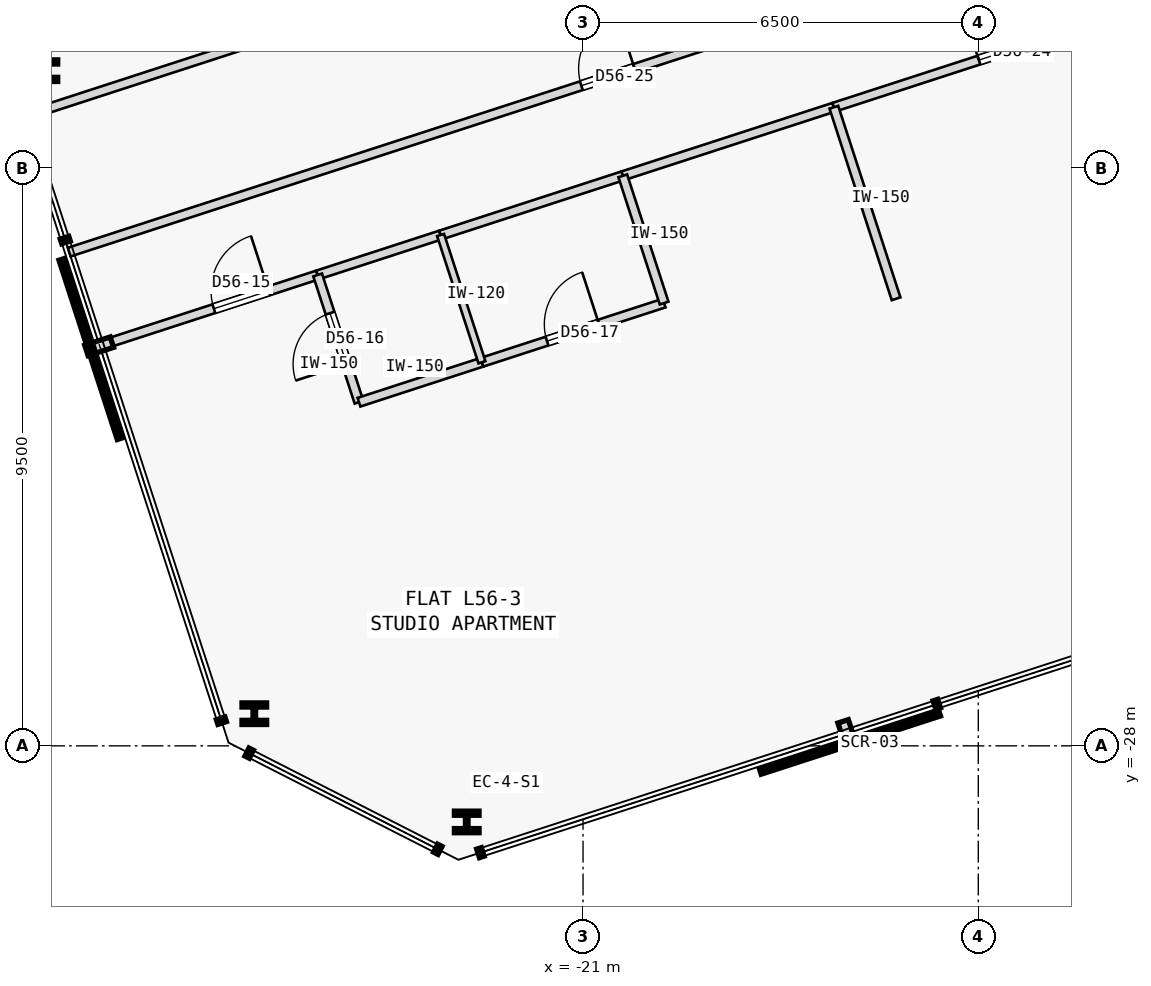
"""IFC4 building model, lengths in metres.
Left out: names, types, materials, properties, quantities, classifications, styles, units other than length and angle.
Written with IfcOpenShell. Run it as: python <this file> out.ifc"""

import sys

from ifc_helpers import new_model, si_unit, direction, frame, frame_2d, origin, origin_2d, place, context, subcontext, project, spatial, rectangle, i_section, extrude, element, fill, save


model = new_model("IFC4")
c1 = context("Model", 3, precision=1e-05, world=origin(), true_north=direction((0.0, 1.0)))
c2 = subcontext(c1, "Body", "Model", "MODEL_VIEW")
j1 = project(units=[si_unit("LENGTHUNIT", "METRE"), si_unit("PLANEANGLEUNIT", "RADIAN")], contexts=[c1])
p1 = place(None, origin())
s1 = spatial("IfcSite", under=j1, at=p1, CompositionType="ELEMENT")
p2 = place(p1, origin())
s2 = spatial("IfcBuilding", under=s1, at=p2, CompositionType="ELEMENT")
p3 = place(p2, frame((0.0, 0.0, 214.25)))
s3 = spatial("IfcBuildingStorey", under=s2, at=p3, CompositionType="ELEMENT", Elevation=214.25)
for number, where, z_axis, x_axis in (
    (1, (-22.913, -29.251, 0.0), (0.0, 0.0, 1.0), (1.0, 0.0, 0.0)),
    (2, (-29.842, -16.897, 0.0), (0.0, 0.0, 1.0), (1.0, 0.0, 0.0)),
    (3, (-26.406, -27.471, 0.0), (0.0, 0.0, 1.0), (1.0, 0.0, 0.0)),
):
    element("IfcColumn", number, at=place(p3, frame(where, z_axis=z_axis, x_axis=x_axis)), inside=s3, PredefinedType="COLUMN", context=c2, shape_type="SweptSolid", body=[
        extrude(i_section(OverallWidth=0.405, OverallDepth=0.355, WebThickness=0.042, FlangeThickness=0.068, FilletRadius=0.015, at=origin_2d()), origin(), (0.0, 0.0, 1.0), 3.35),
    ])
p4 = place(p3, frame((-28.95, -21.421, 0.0), z_axis=(0.0, 0.0, 1.0), x_axis=(0.951052151329, 0.309030428036, 0.0)))
e4 = element("IfcWall", 4, at=p4, inside=s3, PredefinedType="PARTITIONING", context=c2, shape_type="SweptSolid", body=[
    extrude(rectangle(XDim=3.77, YDim=0.15, at=frame_2d((1.885, 0.0))), origin(), (0.0, 0.0, 1.0), 3.125),
])
p5 = place(p4, frame((1.975, 0.0, 0.0)))
e5 = element("IfcOpeningElement", 5, at=p5, cuts=e4, PredefinedType="OPENING", context=c2, shape_type="SweptSolid", body=[
    extrude(rectangle(XDim=0.95, YDim=2.15, at=frame_2d((0.475, 1.075))), frame((0.0, 0.085, 0.0), z_axis=(0.0, -1.0, 0.0), x_axis=(1.0, 0.0, 0.0)), (0.0, 0.0, 1.0), 0.17),
])
p6 = place(p3, frame((-20.347, -18.626, 0.0), z_axis=(0.0, 0.0, 1.0), x_axis=(0.951057168147, 0.309014988174, 0.0)))
e6 = element("IfcWall", 6, at=p6, inside=s3, PredefinedType="PARTITIONING", context=c2, shape_type="SweptSolid", body=[
    extrude(rectangle(XDim=3.65, YDim=0.15, at=frame_2d((1.825, 0.0))), origin(), (0.0, 0.0, 1.0), 3.125),
])
p7 = place(p3, frame((-25.365, -20.256, 0.0), z_axis=(0.0, 0.0, 1.0), x_axis=(0.951056007502, 0.309018560274, 0.0)))
e7 = element("IfcWall", 7, at=p7, inside=s3, PredefinedType="PARTITIONING", context=c2, shape_type="SweptSolid", body=[
    extrude(rectangle(XDim=2.126, YDim=0.15, at=frame_2d((1.063, 0.0))), origin(), (0.0, 0.0, 1.0), 3.125),
])
p8 = place(p3, frame((-23.343, -19.599, 0.0), z_axis=(0.0, 0.0, 1.0), x_axis=(0.951058557014, 0.309010713619, 0.0)))
e8 = element("IfcWall", 8, at=p8, inside=s3, PredefinedType="PARTITIONING", context=c2, shape_type="SweptSolid", body=[
    extrude(rectangle(XDim=3.15, YDim=0.15, at=frame_2d((1.575, 0.0))), origin(), (0.0, 0.0, 1.0), 3.125),
])
p9 = place(p3, frame((-16.875, -17.498, 0.0), z_axis=(0.0, 0.0, 1.0), x_axis=(0.951057944303, 0.309012599384, 0.0)))
e9 = element("IfcWall", 9, at=p9, inside=s3, PredefinedType="PARTITIONING", context=c2, shape_type="SweptSolid", body=[
    extrude(rectangle(XDim=5.936, YDim=0.15, at=frame_2d((2.968, 0.0))), origin(), (0.0, 0.0, 1.0), 3.125),
])
p10 = place(p9, frame((2.508, 0.0, 0.0)))
e10 = element("IfcOpeningElement", 10, at=p10, cuts=e9, PredefinedType="OPENING", context=c2, shape_type="SweptSolid", body=[
    extrude(rectangle(XDim=0.92, YDim=2.15, at=frame_2d((0.46, 1.075))), frame((0.0, 0.085, 0.0), z_axis=(0.0, -1.0, 0.0), x_axis=(1.0, 0.0, 0.0)), (0.0, 0.0, 1.0), 0.17),
])
p11 = place(p3, frame((-29.45, -19.881, 0.0), z_axis=(0.0, 0.0, 1.0), x_axis=(0.95105650271, 0.309017036186, 0.0)))
e11 = element("IfcWall", 11, at=p11, inside=s3, PredefinedType="PARTITIONING", context=c2, shape_type="SweptSolid", body=[
    extrude(rectangle(XDim=18.632, YDim=0.15, at=frame_2d((9.316, 0.0))), origin(), (0.0, 0.0, 1.0), 3.125),
])
p12 = place(p11, frame((8.856, 0.0, 0.0)))
e12 = element("IfcOpeningElement", 12, at=p12, cuts=e11, PredefinedType="OPENING", context=c2, shape_type="SweptSolid", body=[
    extrude(rectangle(XDim=0.92, YDim=2.15, at=frame_2d((0.46, 1.075))), frame((0.0, 0.085, 0.0), z_axis=(0.0, -1.0, 0.0), x_axis=(1.0, 0.0, 0.0)), (0.0, 0.0, 1.0), 0.17),
])
p13 = place(p3, frame((-24.685, -22.349, 0.0), z_axis=(0.0, 0.0, 1.0), x_axis=(-0.309060979314, 0.951042223598, 0.0)))
e13 = element("IfcWall", 13, at=p13, inside=s3, PredefinedType="PARTITIONING", context=c2, shape_type="SweptSolid", body=[
    extrude(rectangle(XDim=2.2, YDim=0.15, at=frame_2d((1.1, 0.0))), origin(), (0.0, 0.0, 1.0), 3.125),
])
p14 = place(p13, frame((0.66, 0.0, 0.0)))
e14 = element("IfcOpeningElement", 14, at=p14, cuts=e13, PredefinedType="OPENING", context=c2, shape_type="SweptSolid", body=[
    extrude(rectangle(XDim=0.88, YDim=2.15, at=frame_2d((0.44, 1.075))), frame((0.0, 0.085, 0.0), z_axis=(0.0, -1.0, 0.0), x_axis=(1.0, 0.0, 0.0)), (0.0, 0.0, 1.0), 0.17),
])
p15 = place(p3, frame((-24.685, -22.349, 0.0), z_axis=(0.0, 0.0, 1.0), x_axis=(0.951056007502, 0.309018560274, 0.0)))
e15 = element("IfcWall", 15, at=p15, inside=s3, PredefinedType="PARTITIONING", context=c2, shape_type="SweptSolid", body=[
    extrude(rectangle(XDim=2.126, YDim=0.15, at=frame_2d((1.063, 0.0))), origin(), (0.0, 0.0, 1.0), 3.125),
])
p16 = place(p3, frame((-22.663, -21.692, 0.0), z_axis=(0.0, 0.0, 1.0), x_axis=(0.951058557014, 0.309010713619, 0.0)))
e16 = element("IfcWall", 16, at=p16, inside=s3, PredefinedType="PARTITIONING", context=c2, shape_type="SweptSolid", body=[
    extrude(rectangle(XDim=3.15, YDim=0.15, at=frame_2d((1.575, 0.0))), origin(), (0.0, 0.0, 1.0), 3.125),
])
p17 = place(p16, frame((1.125, 0.0, 0.0)))
e17 = element("IfcOpeningElement", 17, at=p17, cuts=e16, PredefinedType="OPENING", context=c2, shape_type="SweptSolid", body=[
    extrude(rectangle(XDim=0.9, YDim=2.15, at=frame_2d((0.45, 1.075))), frame((0.0, 0.085, 0.0), z_axis=(0.0, -1.0, 0.0), x_axis=(1.0, 0.0, 0.0)), (0.0, 0.0, 1.0), 0.17),
])
p18 = place(p3, frame((-19.667, -20.718, 0.0), z_axis=(0.0, 0.0, 1.0), x_axis=(-0.309060979314, 0.951042223598, 0.0)))
e18 = element("IfcWall", 18, at=p18, inside=s3, PredefinedType="PARTITIONING", context=c2, shape_type="SweptSolid", body=[
    extrude(rectangle(XDim=2.2, YDim=0.15, at=frame_2d((1.1, 0.0))), origin(), (0.0, 0.0, 1.0), 3.125),
])
p19 = place(p3, frame((-15.852, -20.648, 0.0), z_axis=(0.0, 0.0, 1.0), x_axis=(-0.309009398695, 0.951058984248, 0.0)))
e19 = element("IfcWall", 19, at=p19, inside=s3, PredefinedType="PARTITIONING", context=c2, shape_type="SweptSolid", body=[
    extrude(rectangle(XDim=3.312, YDim=0.15, at=frame_2d((1.656, 0.0))), origin(), (0.0, 0.0, 1.0), 3.125),
])
p20 = place(p3, frame((-22.663, -21.692, 0.0), z_axis=(0.0, 0.0, 1.0), x_axis=(-0.309060979314, 0.951042223598, 0.0)))
e20 = element("IfcWall", 20, at=p20, inside=s3, PredefinedType="PARTITIONING", context=c2, shape_type="SweptSolid", body=[
    extrude(rectangle(XDim=2.2, YDim=0.12, at=frame_2d((1.1, 0.0))), origin(), (0.0, 0.0, 1.0), 3.125),
])
p21 = place(p3, frame((-30.178, -17.642, 0.0), z_axis=(0.0, 0.0, 1.0), x_axis=(0.95105650271, 0.309017036186, 0.0)))
e21 = element("IfcWall", 21, at=p21, inside=s3, PredefinedType="PARTITIONING", context=c2, shape_type="SweptSolid", body=[
    extrude(rectangle(XDim=18.632, YDim=0.15, at=frame_2d((9.316, 0.0))), origin(), (0.0, 0.0, 1.0), 3.125),
])
p22 = place(p21, frame((8.856, 0.0, 0.0)))
e22 = element("IfcOpeningElement", 22, at=p22, cuts=e21, PredefinedType="OPENING", context=c2, shape_type="SweptSolid", body=[
    extrude(rectangle(XDim=0.92, YDim=2.15, at=frame_2d((0.46, 1.075))), frame((0.0, 0.085, 0.0), z_axis=(0.0, -1.0, 0.0), x_axis=(1.0, 0.0, 0.0)), (0.0, 0.0, 1.0), 0.17),
])
p23 = place(p5, origin())
e23 = element("IfcDoor", 23, at=p23, inside=s3, OperationType="SINGLE_SWING_RIGHT", PredefinedType="DOOR", context=c2, shape_type="SweptSolid", body=[
    extrude(rectangle(XDim=0.95, YDim=2.15, at=frame_2d((0.475, 1.075))), frame((0.0, 0.025, 0.0), z_axis=(0.0, -1.0, 0.0), x_axis=(1.0, 0.0, 0.0)), (0.0, 0.0, 1.0), 0.05),
])
fill(e5, e23)
p24 = place(p14, origin())
e24 = element("IfcDoor", 24, at=p24, inside=s3, OperationType="SINGLE_SWING_LEFT", PredefinedType="DOOR", context=c2, shape_type="SweptSolid", body=[
    extrude(rectangle(XDim=0.88, YDim=2.15, at=frame_2d((0.44, 1.075))), frame((0.0, 0.025, 0.0), z_axis=(0.0, -1.0, 0.0), x_axis=(1.0, 0.0, 0.0)), (0.0, 0.0, 1.0), 0.05),
])
fill(e14, e24)
p25 = place(p17, origin())
e25 = element("IfcDoor", 25, at=p25, inside=s3, OperationType="SINGLE_SWING_RIGHT", PredefinedType="DOOR", context=c2, shape_type="SweptSolid", body=[
    extrude(rectangle(XDim=0.9, YDim=2.15, at=frame_2d((0.45, 1.075))), frame((0.0, 0.025, 0.0), z_axis=(0.0, -1.0, 0.0), x_axis=(1.0, 0.0, 0.0)), (0.0, 0.0, 1.0), 0.05),
])
fill(e17, e25)
p26 = place(p10, origin())
e26 = element("IfcDoor", 26, at=p26, inside=s3, OperationType="SINGLE_SWING_LEFT", PredefinedType="DOOR", context=c2, shape_type="SweptSolid", body=[
    extrude(rectangle(XDim=0.92, YDim=2.15, at=frame_2d((0.46, 1.075))), frame((0.0, 0.025, 0.0), z_axis=(0.0, -1.0, 0.0), x_axis=(1.0, 0.0, 0.0)), (0.0, 0.0, 1.0), 0.05),
])
fill(e10, e26)
p27 = place(p12, origin())
e27 = element("IfcDoor", 27, at=p27, inside=s3, OperationType="SINGLE_SWING_RIGHT", PredefinedType="DOOR", context=c2, shape_type="SweptSolid", body=[
    extrude(rectangle(XDim=0.92, YDim=2.15, at=frame_2d((0.46, 1.075))), frame((0.0, 0.025, 0.0), z_axis=(0.0, -1.0, 0.0), x_axis=(1.0, 0.0, 0.0)), (0.0, 0.0, 1.0), 0.05),
])
fill(e12, e27)
save(model, sys.argv[1])
